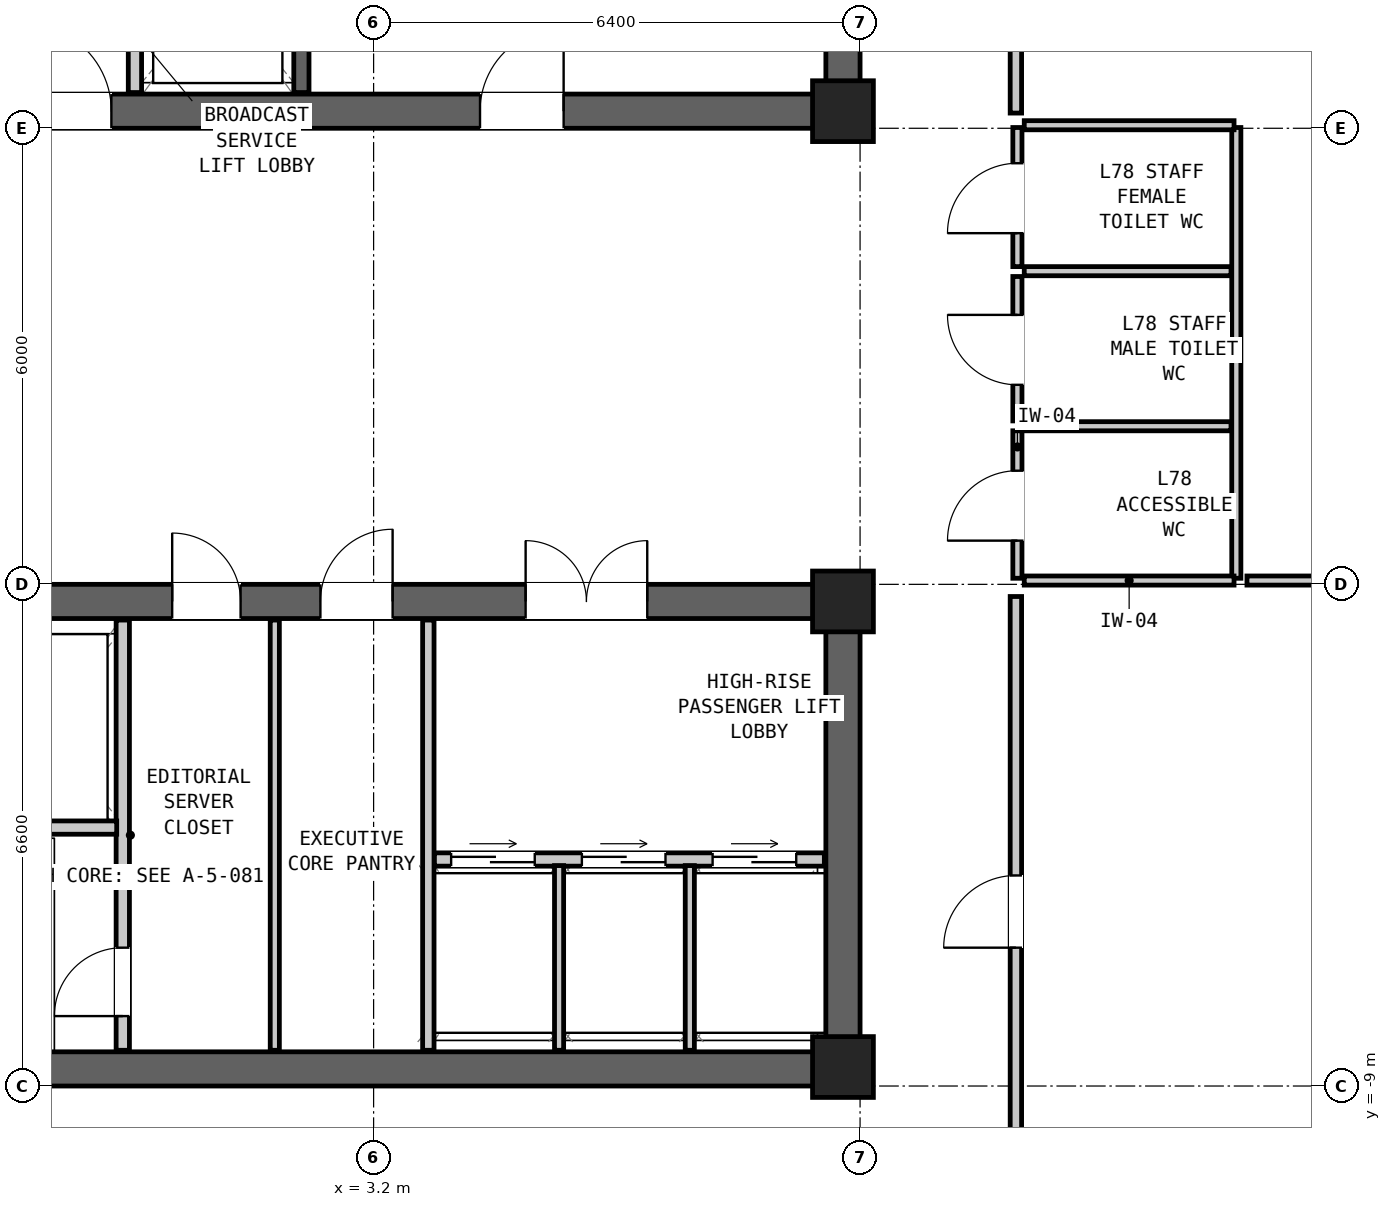
"""IFC4 building model, lengths in metres.
Left out: names, types, materials, properties, quantities, classifications, styles, units other than length and angle.
Written with IfcOpenShell. Run it as: python <this file> out.ifc"""

import sys

from ifc_helpers import new_model, si_unit, direction, frame, frame_2d, origin, origin_2d, place, context, subcontext, project, spatial, rectangle, extrude, element, fill, save


model = new_model("IFC4")
c1 = context("Model", 3, precision=1e-05, world=origin(), true_north=direction((0.0, 1.0)))
c2 = subcontext(c1, "Body", "Model", "MODEL_VIEW")
j1 = project(units=[si_unit("LENGTHUNIT", "METRE"), si_unit("PLANEANGLEUNIT", "RADIAN")], contexts=[c1])
p1 = place(None, origin())
s1 = spatial("IfcSite", under=j1, at=p1, CompositionType="ELEMENT")
p2 = place(p1, origin())
s2 = spatial("IfcBuilding", under=s1, at=p2, CompositionType="ELEMENT")
p3 = place(p2, frame((0.0, 0.0, 264.2)))
s3 = spatial("IfcBuildingStorey", under=s2, at=p3, CompositionType="ELEMENT", Elevation=264.2)
p4 = place(p3, frame((-9.6, 3.825, 0.0), z_axis=(0.0, 0.0, 1.0), x_axis=(1.0, 0.0, 0.0)))
e1 = element("IfcWall", 1, at=p4, inside=s3, PredefinedType="SHEAR", context=c2, shape_type="SweptSolid", body=[
    extrude(rectangle(XDim=19.2, YDim=0.45, at=frame_2d((9.6, 0.0))), origin(), (0.0, 0.0, 1.0), 3.05),
])
p5 = place(p4, frame((14.2, 0.0, 0.0)))
e2 = element("IfcOpeningElement", 2, at=p5, cuts=e1, PredefinedType="OPENING", context=c2, shape_type="SweptSolid", body=[
    extrude(rectangle(XDim=1.1, YDim=2.08, at=frame_2d((0.55, 1.04))), frame((0.0, 0.237, 0.0), z_axis=(0.0, -1.0, 0.0), x_axis=(1.0, 0.0, 0.0)), (0.0, 0.0, 1.0), 0.474),
])
p6 = place(p4, frame((8.2, 0.0, 0.0)))
e3 = element("IfcOpeningElement", 3, at=p6, cuts=e1, PredefinedType="OPENING", context=c2, shape_type="SweptSolid", body=[
    extrude(rectangle(XDim=1.15, YDim=2.1, at=frame_2d((0.575, 1.05))), frame((0.0, 0.237, 0.0), z_axis=(0.0, -1.0, 0.0), x_axis=(1.0, 0.0, 0.0)), (0.0, 0.0, 1.0), 0.474),
])
p7 = place(p4, frame((2.5, 0.0, 0.0)))
e4 = element("IfcOpeningElement", 4, at=p7, cuts=e1, PredefinedType="OPENING", context=c2, shape_type="SweptSolid", body=[
    extrude(rectangle(XDim=1.6, YDim=2.12, at=frame_2d((0.8, 1.06))), frame((0.0, 0.237, 0.0), z_axis=(0.0, -1.0, 0.0), x_axis=(1.0, 0.0, 0.0)), (0.0, 0.0, 1.0), 0.474),
])
p8 = place(p3, frame((9.375, 3.6, 0.0), z_axis=(0.0, 0.0, 1.0), x_axis=(0.0, 1.0, 0.0)))
e5 = element("IfcWall", 5, at=p8, inside=s3, PredefinedType="SHEAR", context=c2, shape_type="SweptSolid", body=[
    extrude(rectangle(XDim=6.6, YDim=0.45, at=frame_2d((3.3, 0.0))), origin(), (0.0, 0.0, 1.0), 3.05),
])
p9 = place(p3, frame((-9.6, -8.775, 0.0), z_axis=(0.0, 0.0, 1.0), x_axis=(1.0, 0.0, 0.0)))
e6 = element("IfcWall", 6, at=p9, inside=s3, PredefinedType="SHEAR", context=c2, shape_type="SweptSolid", body=[
    extrude(rectangle(XDim=19.2, YDim=0.45, at=frame_2d((9.6, 0.0))), origin(), (0.0, 0.0, 1.0), 3.05),
])
p10 = place(p3, frame((-9.6, -2.625, 0.0), z_axis=(0.0, 0.0, 1.0), x_axis=(1.0, 0.0, 0.0)))
e7 = element("IfcWall", 7, at=p10, inside=s3, PredefinedType="SHEAR", context=c2, shape_type="SweptSolid", body=[
    extrude(rectangle(XDim=19.2, YDim=0.45, at=frame_2d((9.6, 0.0))), origin(), (0.0, 0.0, 1.0), 3.05),
])
p11 = place(p10, frame((3.8, 0.0, 0.0)))
e8 = element("IfcOpeningElement", 8, at=p11, cuts=e7, PredefinedType="OPENING", context=c2, shape_type="SweptSolid", body=[
    extrude(rectangle(XDim=1.1, YDim=2.08, at=frame_2d((0.55, 1.04))), frame((0.0, 0.237, 0.0), z_axis=(0.0, -1.0, 0.0), x_axis=(1.0, 0.0, 0.0)), (0.0, 0.0, 1.0), 0.474),
])
p12 = place(p10, frame((10.15, 0.0, 0.0)))
e9 = element("IfcOpeningElement", 9, at=p12, cuts=e7, PredefinedType="OPENING", context=c2, shape_type="SweptSolid", body=[
    extrude(rectangle(XDim=0.9, YDim=2.05, at=frame_2d((0.45, 1.025))), frame((0.0, 0.237, 0.0), z_axis=(0.0, -1.0, 0.0), x_axis=(1.0, 0.0, 0.0)), (0.0, 0.0, 1.0), 0.474),
])
p13 = place(p10, frame((12.1, 0.0, 0.0)))
e10 = element("IfcOpeningElement", 10, at=p13, cuts=e7, PredefinedType="OPENING", context=c2, shape_type="SweptSolid", body=[
    extrude(rectangle(XDim=0.95, YDim=2.1, at=frame_2d((0.475, 1.05))), frame((0.0, 0.237, 0.0), z_axis=(0.0, -1.0, 0.0), x_axis=(1.0, 0.0, 0.0)), (0.0, 0.0, 1.0), 0.474),
])
p14 = place(p10, frame((14.8, 0.0, 0.0)))
e11 = element("IfcOpeningElement", 11, at=p14, cuts=e7, PredefinedType="OPENING", context=c2, shape_type="SweptSolid", body=[
    extrude(rectangle(XDim=1.6, YDim=2.12, at=frame_2d((0.8, 1.06))), frame((0.0, 0.237, 0.0), z_axis=(0.0, -1.0, 0.0), x_axis=(1.0, 0.0, 0.0)), (0.0, 0.0, 1.0), 0.474),
])
p15 = place(p3, frame((9.375, -9.0, 0.0), z_axis=(0.0, 0.0, 1.0), x_axis=(0.0, 1.0, 0.0)))
e12 = element("IfcWall", 12, at=p15, inside=s3, PredefinedType="SHEAR", context=c2, shape_type="SweptSolid", body=[
    extrude(rectangle(XDim=6.6, YDim=0.45, at=frame_2d((3.3, 0.0))), origin(), (0.0, 0.0, 1.0), 3.05),
])
for number, where, z_axis, x_axis in (
    (13, (9.375, 3.825, 0.0), (0.0, 0.0, 1.0), (1.0, 0.0, 0.0)),
    (14, (9.375, -2.625, 0.0), (0.0, 0.0, 1.0), (1.0, 0.0, 0.0)),
    (15, (9.375, -8.75, 0.0), (0.0, 0.0, 1.0), (1.0, 0.0, 0.0)),
):
    element("IfcColumn", number, at=place(p3, frame(where, z_axis=z_axis, x_axis=x_axis)), inside=s3, PredefinedType="COLUMN", context=c2, shape_type="SweptSolid", body=[
        extrude(rectangle(XDim=0.8, YDim=0.8, at=origin_2d()), origin(), (0.0, 0.0, 1.0), 3.05),
    ])
p16 = place(p3, frame((2.25, 4.07, 0.0), z_axis=(0.0, 0.0, 1.0), x_axis=(0.0, 1.0, 0.0)))
e16 = element("IfcWall", 16, at=p16, inside=s3, PredefinedType="SHEAR", context=c2, shape_type="SweptSolid", body=[
    extrude(rectangle(XDim=5.66, YDim=0.2, at=frame_2d((2.83, 0.0))), origin(), (0.0, 0.0, 1.0), 2.86),
])
p17 = place(p16, frame((0.65, 0.0, 0.0)))
e17 = element("IfcOpeningElement", 17, at=p17, cuts=e16, PredefinedType="OPENING", context=c2, shape_type="SweptSolid", body=[
    extrude(rectangle(XDim=1.15, YDim=2.08, at=frame_2d((0.575, 1.04))), frame((0.0, 0.112, 0.0), z_axis=(0.0, -1.0, 0.0), x_axis=(1.0, 0.0, 0.0)), (0.0, 0.0, 1.0), 0.224),
])
p18 = place(p3, frame((0.06, 4.07, 0.0), z_axis=(0.0, 0.0, 1.0), x_axis=(0.0, 1.0, 0.0)))
e18 = element("IfcWall", 18, at=p18, inside=s3, PredefinedType="PARTITIONING", context=c2, shape_type="SweptSolid", body=[
    extrude(rectangle(XDim=5.66, YDim=0.175, at=frame_2d((2.83, 0.0))), origin(), (0.0, 0.0, 1.0), 2.86),
])
p19 = place(p18, frame((3.15, 0.0, 0.0)))
e19 = element("IfcOpeningElement", 19, at=p19, cuts=e18, PredefinedType="OPENING", context=c2, shape_type="SweptSolid", body=[
    extrude(rectangle(XDim=1.4, YDim=2.12, at=frame_2d((0.7, 1.06))), frame((0.0, 0.1, 0.0), z_axis=(0.0, -1.0, 0.0), x_axis=(1.0, 0.0, 0.0)), (0.0, 0.0, 1.0), 0.199),
])
p20 = place(p3, frame((-0.1, -8.53, 0.0), z_axis=(0.0, 0.0, 1.0), x_axis=(0.0, 1.0, 0.0)))
e20 = element("IfcWall", 20, at=p20, inside=s3, PredefinedType="PARTITIONING", context=c2, shape_type="SweptSolid", body=[
    extrude(rectangle(XDim=5.66, YDim=0.175, at=frame_2d((2.83, 0.0))), origin(), (0.0, 0.0, 1.0), 2.86),
])
p21 = place(p20, frame((0.45, 0.0, 0.0)))
e21 = element("IfcOpeningElement", 21, at=p21, cuts=e20, PredefinedType="OPENING", context=c2, shape_type="SweptSolid", body=[
    extrude(rectangle(XDim=0.9, YDim=2.05, at=frame_2d((0.45, 1.025))), frame((0.0, 0.1, 0.0), z_axis=(0.0, -1.0, 0.0), x_axis=(1.0, 0.0, 0.0)), (0.0, 0.0, 1.0), 0.199),
])
p22 = place(p3, frame((-2.15, -5.6, 0.0), z_axis=(0.0, 0.0, 1.0), x_axis=(1.0, 0.0, 0.0)))
e22 = element("IfcWall", 22, at=p22, inside=s3, PredefinedType="PARTITIONING", context=c2, shape_type="SweptSolid", body=[
    extrude(rectangle(XDim=1.97, YDim=0.175, at=frame_2d((0.985, 0.0))), origin(), (0.0, 0.0, 1.0), 2.86),
])
p23 = place(p3, frame((3.92, -8.53, 0.0), z_axis=(0.0, 0.0, 1.0), x_axis=(0.0, 1.0, 0.0)))
e23 = element("IfcWall", 23, at=p23, inside=s3, PredefinedType="PARTITIONING", context=c2, shape_type="SweptSolid", body=[
    extrude(rectangle(XDim=5.66, YDim=0.15, at=frame_2d((2.83, 0.0))), origin(), (0.0, 0.0, 1.0), 2.86),
])
p24 = place(p3, frame((1.9, -8.53, 0.0), z_axis=(0.0, 0.0, 1.0), x_axis=(0.0, 1.0, 0.0)))
e24 = element("IfcWall", 24, at=p24, inside=s3, PredefinedType="PARTITIONING", context=c2, shape_type="SweptSolid", body=[
    extrude(rectangle(XDim=5.66, YDim=0.12, at=frame_2d((2.83, 0.0))), origin(), (0.0, 0.0, 1.0), 2.86),
])
p25 = place(p3, frame((4.0, -6.02, 0.0), z_axis=(0.0, 0.0, 1.0), x_axis=(1.0, 0.0, 0.0)))
e25 = element("IfcWall", 25, at=p25, inside=s3, PredefinedType="PARTITIONING", context=c2, shape_type="SweptSolid", body=[
    extrude(rectangle(XDim=5.13, YDim=0.175, at=frame_2d((2.565, 0.0))), origin(), (0.0, 0.0, 1.0), 2.86),
])
p26 = place(p25, frame((0.22, 0.0, 0.0)))
e26 = element("IfcOpeningElement", 26, at=p26, cuts=e25, PredefinedType="OPENING", context=c2, shape_type="SweptSolid", body=[
    extrude(rectangle(XDim=1.1, YDim=2.06, at=frame_2d((0.55, 1.03))), frame((0.0, 0.1, 0.0), z_axis=(0.0, -1.0, 0.0), x_axis=(1.0, 0.0, 0.0)), (0.0, 0.0, 1.0), 0.199),
])
p27 = place(p25, frame((1.94, 0.0, 0.0)))
e27 = element("IfcOpeningElement", 27, at=p27, cuts=e25, PredefinedType="OPENING", context=c2, shape_type="SweptSolid", body=[
    extrude(rectangle(XDim=1.1, YDim=2.06, at=frame_2d((0.55, 1.03))), frame((0.0, 0.1, 0.0), z_axis=(0.0, -1.0, 0.0), x_axis=(1.0, 0.0, 0.0)), (0.0, 0.0, 1.0), 0.199),
])
p28 = place(p25, frame((3.66, 0.0, 0.0)))
e28 = element("IfcOpeningElement", 28, at=p28, cuts=e25, PredefinedType="OPENING", context=c2, shape_type="SweptSolid", body=[
    extrude(rectangle(XDim=1.1, YDim=2.06, at=frame_2d((0.55, 1.03))), frame((0.0, 0.1, 0.0), z_axis=(0.0, -1.0, 0.0), x_axis=(1.0, 0.0, 0.0)), (0.0, 0.0, 1.0), 0.199),
])
for number, where, z_axis, x_axis in (
    (29, (5.64, -8.53, 0.0), (0.0, 0.0, 1.0), (0.0, 1.0, 0.0)),
    (30, (7.36, -8.53, 0.0), (0.0, 0.0, 1.0), (0.0, 1.0, 0.0)),
):
    element("IfcWall", number, at=place(p3, frame(where, z_axis=z_axis, x_axis=x_axis)), inside=s3, PredefinedType="PARTITIONING", context=c2, shape_type="SweptSolid", body=[
        extrude(rectangle(XDim=2.43, YDim=0.12, at=frame_2d((1.215, 0.0))), origin(), (0.0, 0.0, 1.0), 2.86),
    ])
p29 = place(p3, frame((11.67, -2.32, 0.0), z_axis=(0.0, 0.0, 1.0), x_axis=(0.0, 1.0, 0.0)))
e31 = element("IfcWall", 31, at=p29, inside=s3, PredefinedType="PARTITIONING", context=c2, shape_type="SweptSolid", body=[
    extrude(rectangle(XDim=1.94, YDim=0.12, at=frame_2d((0.97, 0.0))), origin(), (0.0, 0.0, 1.0), 2.86),
])
p30 = place(p29, frame((0.495, 0.0, 0.0)))
e32 = element("IfcOpeningElement", 32, at=p30, cuts=e31, PredefinedType="OPENING", context=c2, shape_type="SweptSolid", body=[
    extrude(rectangle(XDim=0.92, YDim=2.1, at=frame_2d((0.46, 1.05))), frame((0.0, 0.072, 0.0), z_axis=(0.0, -1.0, 0.0), x_axis=(1.0, 0.0, 0.0)), (0.0, 0.0, 1.0), 0.144),
])
p31 = place(p3, frame((11.67, -0.25, 0.0), z_axis=(0.0, 0.0, 1.0), x_axis=(0.0, 1.0, 0.0)))
e33 = element("IfcWall", 33, at=p31, inside=s3, PredefinedType="PARTITIONING", context=c2, shape_type="SweptSolid", body=[
    extrude(rectangle(XDim=1.9, YDim=0.12, at=frame_2d((0.95, 0.0))), origin(), (0.0, 0.0, 1.0), 2.86),
])
p32 = place(p31, frame((0.475, 0.0, 0.0)))
e34 = element("IfcOpeningElement", 34, at=p32, cuts=e33, PredefinedType="OPENING", context=c2, shape_type="SweptSolid", body=[
    extrude(rectangle(XDim=0.92, YDim=2.1, at=frame_2d((0.46, 1.05))), frame((0.0, 0.072, 0.0), z_axis=(0.0, -1.0, 0.0), x_axis=(1.0, 0.0, 0.0)), (0.0, 0.0, 1.0), 0.144),
])
p33 = place(p3, frame((11.67, 1.78, 0.0), z_axis=(0.0, 0.0, 1.0), x_axis=(0.0, 1.0, 0.0)))
e35 = element("IfcWall", 35, at=p33, inside=s3, PredefinedType="PARTITIONING", context=c2, shape_type="SweptSolid", body=[
    extrude(rectangle(XDim=1.83, YDim=0.12, at=frame_2d((0.915, 0.0))), origin(), (0.0, 0.0, 1.0), 2.86),
])
p34 = place(p33, frame((0.44, 0.0, 0.0)))
e36 = element("IfcOpeningElement", 36, at=p34, cuts=e35, PredefinedType="OPENING", context=c2, shape_type="SweptSolid", body=[
    extrude(rectangle(XDim=0.92, YDim=2.1, at=frame_2d((0.46, 1.05))), frame((0.0, 0.072, 0.0), z_axis=(0.0, -1.0, 0.0), x_axis=(1.0, 0.0, 0.0)), (0.0, 0.0, 1.0), 0.144),
])
p35 = place(p3, frame((14.55, -2.32, 0.0), z_axis=(0.0, 0.0, 1.0), x_axis=(0.0, 1.0, 0.0)))
e37 = element("IfcWall", 37, at=p35, inside=s3, PredefinedType="PARTITIONING", context=c2, shape_type="SweptSolid", body=[
    extrude(rectangle(XDim=5.93, YDim=0.12, at=frame_2d((2.965, 0.0))), origin(), (0.0, 0.0, 1.0), 2.86),
])
for number, where, z_axis, x_axis in (
    (38, (11.76, -2.35, 0.0), (0.0, 0.0, 1.0), (1.0, 0.0, 0.0)),
    (39, (11.76, 3.64, 0.0), (0.0, 0.0, 1.0), (1.0, 0.0, 0.0)),
):
    element("IfcWall", number, at=place(p3, frame(where, z_axis=z_axis, x_axis=x_axis)), inside=s3, PredefinedType="PARTITIONING", context=c2, shape_type="SweptSolid", body=[
        extrude(rectangle(XDim=2.76, YDim=0.12, at=frame_2d((1.38, 0.0))), origin(), (0.0, 0.0, 1.0), 1.981),
    ])
for number, where, z_axis, x_axis in (
    (40, (11.76, -0.32, 0.0), (0.0, 0.0, 1.0), (1.0, 0.0, 0.0)),
    (41, (11.76, 1.72, 0.0), (0.0, 0.0, 1.0), (1.0, 0.0, 0.0)),
):
    element("IfcWall", number, at=place(p3, frame(where, z_axis=z_axis, x_axis=x_axis)), inside=s3, PredefinedType="PARTITIONING", context=c2, shape_type="SweptSolid", body=[
        extrude(rectangle(XDim=2.72, YDim=0.12, at=frame_2d((1.36, 0.0))), origin(), (0.0, 0.0, 1.0), 2.86),
    ])
p36 = place(p3, frame((14.69, -2.35, 0.0), z_axis=(0.0, 0.0, 1.0), x_axis=(1.0, 0.0, 0.0)))
e42 = element("IfcWall", 42, at=p36, inside=s3, PredefinedType="PARTITIONING", context=c2, shape_type="SweptSolid", body=[
    extrude(rectangle(XDim=6.927, YDim=0.12, at=frame_2d((3.464, 0.0))), origin(), (0.0, 0.0, 1.0), 1.981),
])
p37 = place(p3, frame((11.65, -10.85, 0.0), z_axis=(0.0, 0.0, 1.0), x_axis=(0.0, 1.0, 0.0)))
e43 = element("IfcWall", 43, at=p37, inside=s3, PredefinedType="PARTITIONING", context=c2, shape_type="SweptSolid", body=[
    extrude(rectangle(XDim=8.29, YDim=0.15, at=frame_2d((4.145, 0.0))), origin(), (0.0, 0.0, 1.0), 2.86),
])
p38 = place(p37, frame((3.67, 0.0, 0.0)))
e44 = element("IfcOpeningElement", 44, at=p38, cuts=e43, PredefinedType="OPENING", context=c2, shape_type="SweptSolid", body=[
    extrude(rectangle(XDim=0.95, YDim=2.1, at=frame_2d((0.475, 1.05))), frame((0.0, 0.087, 0.0), z_axis=(0.0, -1.0, 0.0), x_axis=(1.0, 0.0, 0.0)), (0.0, 0.0, 1.0), 0.174),
])
p39 = place(p3, frame((11.65, 3.8, 0.0), z_axis=(0.0, 0.0, 1.0), x_axis=(0.0, 1.0, 0.0)))
e45 = element("IfcWall", 45, at=p39, inside=s3, PredefinedType="PARTITIONING", context=c2, shape_type="SweptSolid", body=[
    extrude(rectangle(XDim=8.25, YDim=0.15, at=frame_2d((4.125, 0.0))), origin(), (0.0, 0.0, 1.0), 2.86),
])
p40 = place(p39, frame((3.65, 0.0, 0.0)))
e46 = element("IfcOpeningElement", 46, at=p40, cuts=e45, PredefinedType="OPENING", context=c2, shape_type="SweptSolid", body=[
    extrude(rectangle(XDim=0.95, YDim=2.1, at=frame_2d((0.475, 1.05))), frame((0.0, 0.087, 0.0), z_axis=(0.0, -1.0, 0.0), x_axis=(1.0, 0.0, 0.0)), (0.0, 0.0, 1.0), 0.174),
])
p41 = place(p5, origin())
e47 = element("IfcDoor", 47, at=p41, inside=s3, OperationType="SINGLE_SWING_RIGHT", PredefinedType="DOOR", context=c2, shape_type="SweptSolid", body=[
    extrude(rectangle(XDim=1.1, YDim=2.08, at=frame_2d((0.55, 1.04))), frame((0.0, 0.025, 0.0), z_axis=(0.0, -1.0, 0.0), x_axis=(1.0, 0.0, 0.0)), (0.0, 0.0, 1.0), 0.05),
])
fill(e2, e47)
p42 = place(p6, origin())
e48 = element("IfcDoor", 48, at=p42, inside=s3, OperationType="SINGLE_SWING_LEFT", PredefinedType="DOOR", context=c2, shape_type="SweptSolid", body=[
    extrude(rectangle(XDim=1.15, YDim=2.1, at=frame_2d((0.575, 1.05))), frame((0.0, 0.025, 0.0), z_axis=(0.0, -1.0, 0.0), x_axis=(1.0, 0.0, 0.0)), (0.0, 0.0, 1.0), 0.05),
])
fill(e3, e48)
p43 = place(p21, origin())
e49 = element("IfcDoor", 49, at=p43, inside=s3, OperationType="SINGLE_SWING_LEFT", PredefinedType="DOOR", context=c2, shape_type="SweptSolid", body=[
    extrude(rectangle(XDim=0.9, YDim=2.05, at=frame_2d((0.45, 1.025))), frame((0.0, 0.025, 0.0), z_axis=(0.0, -1.0, 0.0), x_axis=(1.0, 0.0, 0.0)), (0.0, 0.0, 1.0), 0.05),
])
fill(e21, e49)
p44 = place(p12, origin())
e50 = element("IfcDoor", 50, at=p44, inside=s3, OperationType="SINGLE_SWING_LEFT", PredefinedType="DOOR", context=c2, shape_type="SweptSolid", body=[
    extrude(rectangle(XDim=0.9, YDim=2.05, at=frame_2d((0.45, 1.025))), frame((0.0, 0.025, 0.0), z_axis=(0.0, -1.0, 0.0), x_axis=(1.0, 0.0, 0.0)), (0.0, 0.0, 1.0), 0.05),
])
fill(e9, e50)
p45 = place(p13, origin())
e51 = element("IfcDoor", 51, at=p45, inside=s3, OperationType="SINGLE_SWING_RIGHT", PredefinedType="DOOR", context=c2, shape_type="SweptSolid", body=[
    extrude(rectangle(XDim=0.95, YDim=2.1, at=frame_2d((0.475, 1.05))), frame((0.0, 0.025, 0.0), z_axis=(0.0, -1.0, 0.0), x_axis=(1.0, 0.0, 0.0)), (0.0, 0.0, 1.0), 0.05),
])
fill(e10, e51)
p46 = place(p26, origin())
e52 = element("IfcDoor", 52, at=p46, inside=s3, OperationType="DOUBLE_DOOR_SLIDING", PredefinedType="DOOR", context=c2, shape_type="SweptSolid", body=[
    extrude(rectangle(XDim=1.1, YDim=2.06, at=frame_2d((0.55, 1.03))), frame((0.0, 0.025, 0.0), z_axis=(0.0, -1.0, 0.0), x_axis=(1.0, 0.0, 0.0)), (0.0, 0.0, 1.0), 0.05),
])
fill(e26, e52)
p47 = place(p27, origin())
e53 = element("IfcDoor", 53, at=p47, inside=s3, OperationType="DOUBLE_DOOR_SLIDING", PredefinedType="DOOR", context=c2, shape_type="SweptSolid", body=[
    extrude(rectangle(XDim=1.1, YDim=2.06, at=frame_2d((0.55, 1.03))), frame((0.0, 0.025, 0.0), z_axis=(0.0, -1.0, 0.0), x_axis=(1.0, 0.0, 0.0)), (0.0, 0.0, 1.0), 0.05),
])
fill(e27, e53)
p48 = place(p28, origin())
e54 = element("IfcDoor", 54, at=p48, inside=s3, OperationType="DOUBLE_DOOR_SLIDING", PredefinedType="DOOR", context=c2, shape_type="SweptSolid", body=[
    extrude(rectangle(XDim=1.1, YDim=2.06, at=frame_2d((0.55, 1.03))), frame((0.0, 0.025, 0.0), z_axis=(0.0, -1.0, 0.0), x_axis=(1.0, 0.0, 0.0)), (0.0, 0.0, 1.0), 0.05),
])
fill(e28, e54)
p49 = place(p14, origin())
e55 = element("IfcDoor", 55, at=p49, inside=s3, OperationType="DOUBLE_DOOR_SINGLE_SWING", PredefinedType="DOOR", context=c2, shape_type="SweptSolid", body=[
    extrude(rectangle(XDim=1.6, YDim=2.12, at=frame_2d((0.8, 1.06))), frame((0.0, 0.025, 0.0), z_axis=(0.0, -1.0, 0.0), x_axis=(1.0, 0.0, 0.0)), (0.0, 0.0, 1.0), 0.05),
])
fill(e11, e55)
p50 = place(p30, origin())
e56 = element("IfcDoor", 56, at=p50, inside=s3, OperationType="SINGLE_SWING_LEFT", PredefinedType="DOOR", context=c2, shape_type="SweptSolid", body=[
    extrude(rectangle(XDim=0.92, YDim=2.1, at=frame_2d((0.46, 1.05))), frame((0.0, 0.025, 0.0), z_axis=(0.0, -1.0, 0.0), x_axis=(1.0, 0.0, 0.0)), (0.0, 0.0, 1.0), 0.05),
])
fill(e32, e56)
p51 = place(p32, origin())
e57 = element("IfcDoor", 57, at=p51, inside=s3, OperationType="SINGLE_SWING_RIGHT", PredefinedType="DOOR", context=c2, shape_type="SweptSolid", body=[
    extrude(rectangle(XDim=0.92, YDim=2.1, at=frame_2d((0.46, 1.05))), frame((0.0, 0.025, 0.0), z_axis=(0.0, -1.0, 0.0), x_axis=(1.0, 0.0, 0.0)), (0.0, 0.0, 1.0), 0.05),
])
fill(e34, e57)
p52 = place(p34, origin())
e58 = element("IfcDoor", 58, at=p52, inside=s3, OperationType="SINGLE_SWING_LEFT", PredefinedType="DOOR", context=c2, shape_type="SweptSolid", body=[
    extrude(rectangle(XDim=0.92, YDim=2.1, at=frame_2d((0.46, 1.05))), frame((0.0, 0.025, 0.0), z_axis=(0.0, -1.0, 0.0), x_axis=(1.0, 0.0, 0.0)), (0.0, 0.0, 1.0), 0.05),
])
fill(e36, e58)
p53 = place(p38, origin())
e59 = element("IfcDoor", 59, at=p53, inside=s3, OperationType="SINGLE_SWING_LEFT", PredefinedType="DOOR", context=c2, shape_type="SweptSolid", body=[
    extrude(rectangle(XDim=0.95, YDim=2.1, at=frame_2d((0.475, 1.05))), frame((0.0, 0.025, 0.0), z_axis=(0.0, -1.0, 0.0), x_axis=(1.0, 0.0, 0.0)), (0.0, 0.0, 1.0), 0.05),
])
fill(e44, e59)
save(model, sys.argv[1])
